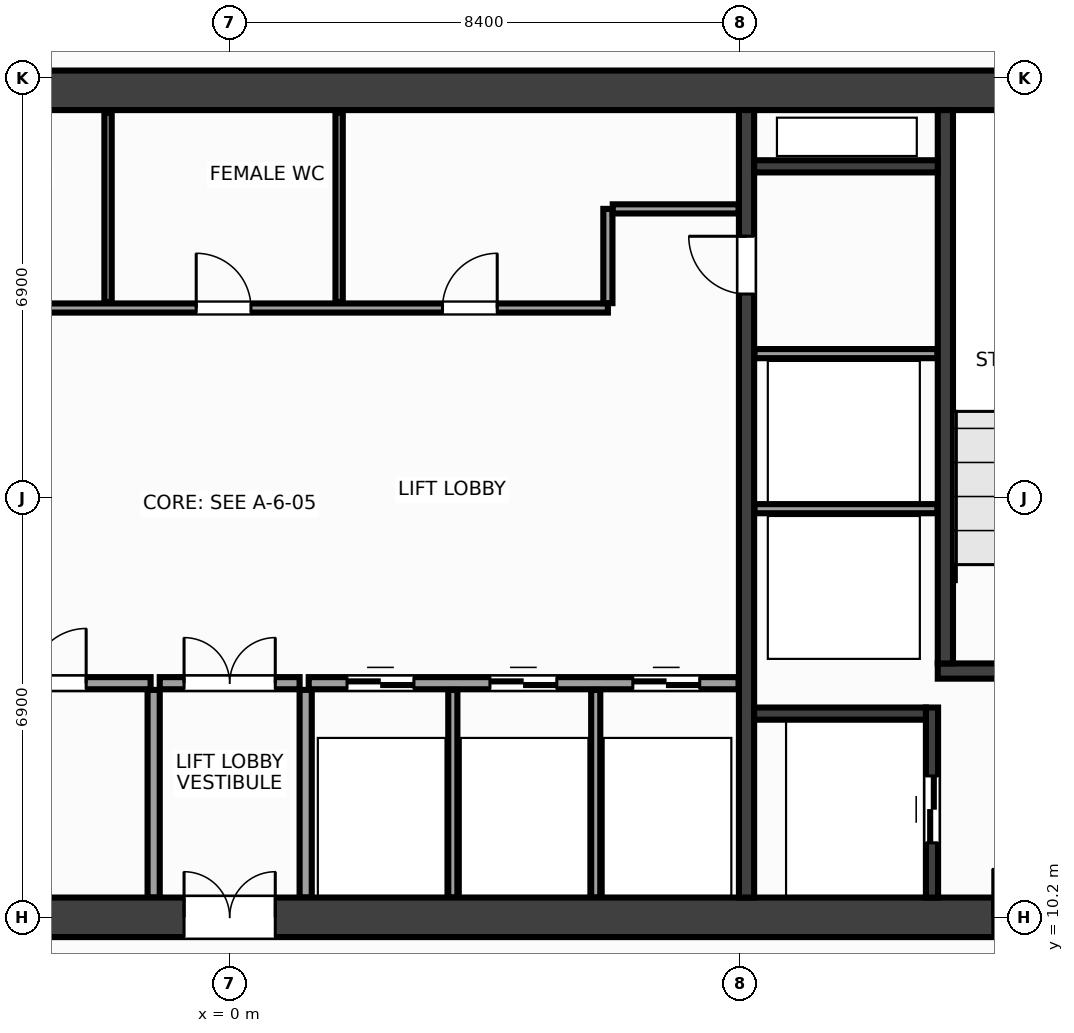
"""IFC4 building model, lengths in metres.
Left out: names, types, materials, properties, quantities, classifications, styles, units other than length and angle.
Written with IfcOpenShell. Run it as: python <this file> out.ifc"""

import sys

from ifc_helpers import new_model, si_unit, direction, frame, frame_2d, origin, place, context, subcontext, project, spatial, rectangle, extrude, source, transform, mapped, element, fill, save


model = new_model("IFC4")
c1 = context("Model", 3, precision=1e-05, world=origin(), true_north=direction((0.0, 1.0)))
c2 = subcontext(c1, "Body", "Model", "MODEL_VIEW")
j1 = project(units=[si_unit("LENGTHUNIT", "METRE"), si_unit("PLANEANGLEUNIT", "RADIAN")], contexts=[c1])
p1 = place(None, origin())
s1 = spatial("IfcSite", under=j1, at=p1, CompositionType="ELEMENT")
p2 = place(p1, origin())
s2 = spatial("IfcBuilding", under=s1, at=p2, CompositionType="ELEMENT")
p3 = place(p2, frame((0.0, 0.0, 160.4)))
s3 = spatial("IfcBuildingStorey", under=s2, at=p3, CompositionType="ELEMENT", Elevation=160.4)
m1 = source(origin(), c2, "Body", "SweptSolid", [
    extrude(rectangle(XDim=31.85, YDim=0.65, at=frame_2d((15.925, 0.0))), origin(), (0.0, 0.0, 1.0), 3.6),
])
p4 = place(p3, frame((-15.925, 23.8, 0.0), z_axis=(0.0, 0.0, 1.0), x_axis=(1.0, 0.0, 0.0)))
e1 = element("IfcWall", 1, at=p4, inside=s3, PredefinedType="SHEAR", context=c2, shape_type="MappedRepresentation", body=[
    mapped(m1, transform((0.0, 0.0, 0.0), x_axis=(1.0, 0.0, 0.0), y_axis=(0.0, 1.0, 0.0), z_axis=(0.0, 0.0, 1.0), scale=1.0)),
])
p5 = place(p3, frame((-15.925, 10.2, 0.0), z_axis=(0.0, 0.0, 1.0), x_axis=(1.0, 0.0, 0.0)))
e2 = element("IfcWall", 2, at=p5, inside=s3, PredefinedType="SHEAR", context=c2, shape_type="MappedRepresentation", body=[
    mapped(m1, transform((0.0, 0.0, 0.0), x_axis=(1.0, 0.0, 0.0), y_axis=(0.0, 1.0, 0.0), z_axis=(0.0, 0.0, 1.0), scale=1.0)),
])
p6 = place(p5, frame((1.775, 0.0, 0.0)))
e3 = element("IfcOpeningElement", 3, at=p6, cuts=e2, PredefinedType="OPENING", context=c2, shape_type="SweptSolid", body=[
    extrude(rectangle(XDim=1.6, YDim=2.15, at=frame_2d((0.8, 1.075))), frame((0.0, 0.337, 0.0), z_axis=(0.0, -1.0, 0.0), x_axis=(1.0, 0.0, 0.0)), (0.0, 0.0, 1.0), 0.674),
])
p7 = place(p5, frame((28.475, 0.0, 0.0)))
e4 = element("IfcOpeningElement", 4, at=p7, cuts=e2, PredefinedType="OPENING", context=c2, shape_type="SweptSolid", body=[
    extrude(rectangle(XDim=1.6, YDim=2.15, at=frame_2d((0.8, 1.075))), frame((0.0, 0.337, 0.0), z_axis=(0.0, -1.0, 0.0), x_axis=(1.0, 0.0, 0.0)), (0.0, 0.0, 1.0), 0.674),
])
p8 = place(p5, frame((15.175, 0.0, 0.0)))
e5 = element("IfcOpeningElement", 5, at=p8, cuts=e2, PredefinedType="OPENING", context=c2, shape_type="SweptSolid", body=[
    extrude(rectangle(XDim=1.5, YDim=2.2, at=frame_2d((0.75, 1.1))), frame((0.0, 0.337, 0.0), z_axis=(0.0, -1.0, 0.0), x_axis=(1.0, 0.0, 0.0)), (0.0, 0.0, 1.0), 0.674),
])
m2 = source(origin(), c2, "Body", "SweptSolid", [
    extrude(rectangle(XDim=12.95, YDim=0.25, at=frame_2d((6.475, 0.0))), origin(), (0.0, 0.0, 1.0), 3.6),
])
p9 = place(p3, frame((8.5, 10.525, 0.0), z_axis=(0.0, 0.0, 1.0), x_axis=(0.0, 1.0, 0.0)))
e6 = element("IfcWall", 6, at=p9, inside=s3, PredefinedType="SHEAR", context=c2, shape_type="MappedRepresentation", body=[
    mapped(m2, transform((0.0, 0.0, 0.0), x_axis=(1.0, 0.0, 0.0), y_axis=(0.0, 1.0, 0.0), z_axis=(0.0, 0.0, 1.0), scale=1.0)),
])
p10 = place(p9, frame((9.925, 0.0, 0.0)))
e7 = element("IfcOpeningElement", 7, at=p10, cuts=e6, PredefinedType="OPENING", context=c2, shape_type="SweptSolid", body=[
    extrude(rectangle(XDim=0.95, YDim=2.15, at=frame_2d((0.475, 1.075))), frame((0.0, 0.137, 0.0), z_axis=(0.0, -1.0, 0.0), x_axis=(1.0, 0.0, 0.0)), (0.0, 0.0, 1.0), 0.274),
])
m3 = source(origin(), c2, "Body", "SweptSolid", [
    extrude(rectangle(XDim=3.63, YDim=0.25, at=frame_2d((1.815, 0.0))), origin(), (0.0, 0.0, 1.0), 3.6),
])
p11 = place(p3, frame((11.645, 14.25, 0.0), z_axis=(0.0, 0.0, 1.0), x_axis=(1.0, 0.0, 0.0)))
e8 = element("IfcWall", 8, at=p11, inside=s3, PredefinedType="SHEAR", context=c2, shape_type="MappedRepresentation", body=[
    mapped(m3, transform((0.0, 0.0, 0.0), x_axis=(1.0, 0.0, 0.0), y_axis=(0.0, 1.0, 0.0), z_axis=(0.0, 0.0, 1.0), scale=1.0)),
])
p12 = place(p11, frame((0.95, 0.0, 0.0)))
e9 = element("IfcOpeningElement", 9, at=p12, cuts=e8, PredefinedType="OPENING", context=c2, shape_type="SweptSolid", body=[
    extrude(rectangle(XDim=1.6, YDim=2.15, at=frame_2d((0.8, 1.075))), frame((0.0, 0.137, 0.0), z_axis=(0.0, -1.0, 0.0), x_axis=(1.0, 0.0, 0.0)), (0.0, 0.0, 1.0), 0.274),
])
m4 = source(origin(), c2, "Body", "SweptSolid", [
    extrude(rectangle(XDim=9.1, YDim=0.25, at=frame_2d((4.55, 0.0))), origin(), (0.0, 0.0, 1.0), 3.6),
])
p13 = place(p3, frame((11.77, 14.375, 0.0), z_axis=(0.0, 0.0, 1.0), x_axis=(0.0, 1.0, 0.0)))
e10 = element("IfcWall", 10, at=p13, inside=s3, PredefinedType="SHEAR", context=c2, shape_type="MappedRepresentation", body=[
    mapped(m4, transform((0.0, 0.0, 0.0), x_axis=(1.0, 0.0, 0.0), y_axis=(0.0, 1.0, 0.0), z_axis=(0.0, 0.0, 1.0), scale=1.0)),
])
m5 = source(origin(), c2, "Body", "SweptSolid", [
    extrude(rectangle(XDim=3.125, YDim=0.2, at=frame_2d((1.562, 0.0))), origin(), (0.0, 0.0, 1.0), 3.6),
])
p14 = place(p3, frame((11.55, 10.525, 0.0), z_axis=(0.0, 0.0, 1.0), x_axis=(0.0, 1.0, 0.0)))
e11 = element("IfcWall", 11, at=p14, inside=s3, PredefinedType="SHEAR", context=c2, shape_type="MappedRepresentation", body=[
    mapped(m5, transform((0.0, 0.0, 0.0), x_axis=(1.0, 0.0, 0.0), y_axis=(0.0, 1.0, 0.0), z_axis=(0.0, 0.0, 1.0), scale=1.0)),
])
p15 = place(p14, frame((0.9, 0.0, 0.0)))
e12 = element("IfcOpeningElement", 12, at=p15, cuts=e11, PredefinedType="OPENING", context=c2, shape_type="SweptSolid", body=[
    extrude(rectangle(XDim=1.1, YDim=2.15, at=frame_2d((0.55, 1.075))), frame((0.0, 0.112, 0.0), z_axis=(0.0, -1.0, 0.0), x_axis=(1.0, 0.0, 0.0)), (0.0, 0.0, 1.0), 0.224),
])
m6 = source(origin(), c2, "Body", "SweptSolid", [
    extrude(rectangle(XDim=2.825, YDim=0.2, at=frame_2d((1.413, 0.0))), origin(), (0.0, 0.0, 1.0), 3.6),
])
p16 = place(p3, frame((8.625, 13.55, 0.0), z_axis=(0.0, 0.0, 1.0), x_axis=(1.0, 0.0, 0.0)))
e13 = element("IfcWall", 13, at=p16, inside=s3, PredefinedType="SHEAR", context=c2, shape_type="MappedRepresentation", body=[
    mapped(m6, transform((0.0, 0.0, 0.0), x_axis=(1.0, 0.0, 0.0), y_axis=(0.0, 1.0, 0.0), z_axis=(0.0, 0.0, 1.0), scale=1.0)),
])
m7 = source(origin(), c2, "Body", "SweptSolid", [
    extrude(rectangle(XDim=3.02, YDim=0.2, at=frame_2d((1.51, 0.0))), origin(), (0.0, 0.0, 1.0), 3.6),
])
p17 = place(p3, frame((8.625, 22.55, 0.0), z_axis=(0.0, 0.0, 1.0), x_axis=(1.0, 0.0, 0.0)))
e14 = element("IfcWall", 14, at=p17, inside=s3, PredefinedType="SHEAR", context=c2, shape_type="MappedRepresentation", body=[
    mapped(m7, transform((0.0, 0.0, 0.0), x_axis=(1.0, 0.0, 0.0), y_axis=(0.0, 1.0, 0.0), z_axis=(0.0, 0.0, 1.0), scale=1.0)),
])
m8 = source(origin(), c2, "Body", "SweptSolid", [
    extrude(rectangle(XDim=3.01, YDim=0.15, at=frame_2d((1.505, 0.0))), origin(), (0.0, 0.0, 1.0), 3.38),
])
for number, where, z_axis, x_axis in (
    (15, (8.63, 16.92, 0.0), (0.0, 0.0, 1.0), (1.0, 0.0, 0.0)),
    (16, (8.63, 19.47, 0.0), (0.0, 0.0, 1.0), (1.0, 0.0, 0.0)),
):
    element("IfcWall", number, at=place(p3, frame(where, z_axis=z_axis, x_axis=x_axis)), inside=s3, PredefinedType="PARTITIONING", context=c2, shape_type="MappedRepresentation", body=[
        mapped(m8, transform((0.0, 0.0, 0.0), x_axis=(1.0, 0.0, 0.0), y_axis=(0.0, 1.0, 0.0), z_axis=(0.0, 0.0, 1.0), scale=1.0)),
    ])
m9 = source(origin(), c2, "Body", "SweptSolid", [
    extrude(rectangle(XDim=7.07, YDim=0.2, at=frame_2d((3.535, 0.0))), origin(), (0.0, 0.0, 1.0), 3.38),
])
p18 = place(p3, frame((-8.37, 14.05, 0.0), z_axis=(0.0, 0.0, 1.0), x_axis=(1.0, 0.0, 0.0)))
e17 = element("IfcWall", 17, at=p18, inside=s3, PredefinedType="PARTITIONING", context=c2, shape_type="MappedRepresentation", body=[
    mapped(m9, transform((0.0, 0.0, 0.0), x_axis=(1.0, 0.0, 0.0), y_axis=(0.0, 1.0, 0.0), z_axis=(0.0, 0.0, 1.0), scale=1.0)),
])
p19 = place(p18, frame((1.66, 0.0, 0.0)))
e18 = element("IfcOpeningElement", 18, at=p19, cuts=e17, PredefinedType="OPENING", context=c2, shape_type="SweptSolid", body=[
    extrude(rectangle(XDim=0.9, YDim=2.15, at=frame_2d((0.45, 1.075))), frame((0.0, 0.112, 0.0), z_axis=(0.0, -1.0, 0.0), x_axis=(1.0, 0.0, 0.0)), (0.0, 0.0, 1.0), 0.224),
])
p20 = place(p18, frame((5.11, 0.0, 0.0)))
e19 = element("IfcOpeningElement", 19, at=p20, cuts=e17, PredefinedType="OPENING", context=c2, shape_type="SweptSolid", body=[
    extrude(rectangle(XDim=0.9, YDim=2.15, at=frame_2d((0.45, 1.075))), frame((0.0, 0.112, 0.0), z_axis=(0.0, -1.0, 0.0), x_axis=(1.0, 0.0, 0.0)), (0.0, 0.0, 1.0), 0.224),
])
p21 = place(p3, frame((1.3, 14.05, 0.0), z_axis=(0.0, 0.0, 1.0), x_axis=(1.0, 0.0, 0.0)))
e20 = element("IfcWall", 20, at=p21, inside=s3, PredefinedType="PARTITIONING", context=c2, shape_type="MappedRepresentation", body=[
    mapped(m9, transform((0.0, 0.0, 0.0), x_axis=(1.0, 0.0, 0.0), y_axis=(0.0, 1.0, 0.0), z_axis=(0.0, 0.0, 1.0), scale=1.0)),
])
p22 = place(p21, frame((0.63, 0.0, 0.0)))
e21 = element("IfcOpeningElement", 21, at=p22, cuts=e20, PredefinedType="OPENING", context=c2, shape_type="SweptSolid", body=[
    extrude(rectangle(XDim=1.1, YDim=2.15, at=frame_2d((0.55, 1.075))), frame((0.0, 0.112, 0.0), z_axis=(0.0, -1.0, 0.0), x_axis=(1.0, 0.0, 0.0)), (0.0, 0.0, 1.0), 0.224),
])
p23 = place(p21, frame((2.98, 0.0, 0.0)))
e22 = element("IfcOpeningElement", 22, at=p23, cuts=e20, PredefinedType="OPENING", context=c2, shape_type="SweptSolid", body=[
    extrude(rectangle(XDim=1.1, YDim=2.15, at=frame_2d((0.55, 1.075))), frame((0.0, 0.112, 0.0), z_axis=(0.0, -1.0, 0.0), x_axis=(1.0, 0.0, 0.0)), (0.0, 0.0, 1.0), 0.224),
])
p24 = place(p21, frame((5.33, 0.0, 0.0)))
e23 = element("IfcOpeningElement", 23, at=p24, cuts=e20, PredefinedType="OPENING", context=c2, shape_type="SweptSolid", body=[
    extrude(rectangle(XDim=1.1, YDim=2.15, at=frame_2d((0.55, 1.075))), frame((0.0, 0.112, 0.0), z_axis=(0.0, -1.0, 0.0), x_axis=(1.0, 0.0, 0.0)), (0.0, 0.0, 1.0), 0.224),
])
m10 = source(origin(), c2, "Body", "SweptSolid", [
    extrude(rectangle(XDim=3.415, YDim=0.2, at=frame_2d((1.708, 0.0))), origin(), (0.0, 0.0, 1.0), 3.38),
])
for number, where, z_axis, x_axis in (
    (24, (-1.25, 10.525, 0.0), (0.0, 0.0, 1.0), (0.0, 1.0, 0.0)),
    (25, (1.25, 10.525, 0.0), (0.0, 0.0, 1.0), (0.0, 1.0, 0.0)),
):
    element("IfcWall", number, at=place(p3, frame(where, z_axis=z_axis, x_axis=x_axis)), inside=s3, PredefinedType="PARTITIONING", context=c2, shape_type="MappedRepresentation", body=[
        mapped(m10, transform((0.0, 0.0, 0.0), x_axis=(1.0, 0.0, 0.0), y_axis=(0.0, 1.0, 0.0), z_axis=(0.0, 0.0, 1.0), scale=1.0)),
    ])
m11 = source(origin(), c2, "Body", "SweptSolid", [
    extrude(rectangle(XDim=2.3, YDim=0.2, at=frame_2d((1.15, 0.0))), origin(), (0.0, 0.0, 1.0), 3.38),
])
p25 = place(p3, frame((-1.15, 14.05, 0.0), z_axis=(0.0, 0.0, 1.0), x_axis=(1.0, 0.0, 0.0)))
e26 = element("IfcWall", 26, at=p25, inside=s3, PredefinedType="PARTITIONING", context=c2, shape_type="MappedRepresentation", body=[
    mapped(m11, transform((0.0, 0.0, 0.0), x_axis=(1.0, 0.0, 0.0), y_axis=(0.0, 1.0, 0.0), z_axis=(0.0, 0.0, 1.0), scale=1.0)),
])
p26 = place(p25, frame((0.4, 0.0, 0.0)))
e27 = element("IfcOpeningElement", 27, at=p26, cuts=e26, PredefinedType="OPENING", context=c2, shape_type="SweptSolid", body=[
    extrude(rectangle(XDim=1.5, YDim=2.2, at=frame_2d((0.75, 1.1))), frame((0.0, 0.112, 0.0), z_axis=(0.0, -1.0, 0.0), x_axis=(1.0, 0.0, 0.0)), (0.0, 0.0, 1.0), 0.224),
])
m12 = source(origin(), c2, "Body", "SweptSolid", [
    extrude(rectangle(XDim=14.59, YDim=0.15, at=frame_2d((7.295, 0.0))), origin(), (0.0, 0.0, 1.0), 3.38),
])
p27 = place(p3, frame((-8.37, 20.22, 0.0), z_axis=(0.0, 0.0, 1.0), x_axis=(1.0, 0.0, 0.0)))
e28 = element("IfcWall", 28, at=p27, inside=s3, PredefinedType="PARTITIONING", context=c2, shape_type="MappedRepresentation", body=[
    mapped(m12, transform((0.0, 0.0, 0.0), x_axis=(1.0, 0.0, 0.0), y_axis=(0.0, 1.0, 0.0), z_axis=(0.0, 0.0, 1.0), scale=1.0)),
])
p28 = place(p27, frame((1.06, 0.0, 0.0)))
e29 = element("IfcOpeningElement", 29, at=p28, cuts=e28, PredefinedType="OPENING", context=c2, shape_type="SweptSolid", body=[
    extrude(rectangle(XDim=0.9, YDim=2.15, at=frame_2d((0.45, 1.075))), frame((0.0, 0.087, 0.0), z_axis=(0.0, -1.0, 0.0), x_axis=(1.0, 0.0, 0.0)), (0.0, 0.0, 1.0), 0.174),
])
p29 = place(p27, frame((4.22, 0.0, 0.0)))
e30 = element("IfcOpeningElement", 30, at=p29, cuts=e28, PredefinedType="OPENING", context=c2, shape_type="SweptSolid", body=[
    extrude(rectangle(XDim=0.9, YDim=2.15, at=frame_2d((0.45, 1.075))), frame((0.0, 0.087, 0.0), z_axis=(0.0, -1.0, 0.0), x_axis=(1.0, 0.0, 0.0)), (0.0, 0.0, 1.0), 0.174),
])
p30 = place(p27, frame((7.82, 0.0, 0.0)))
e31 = element("IfcOpeningElement", 31, at=p30, cuts=e28, PredefinedType="OPENING", context=c2, shape_type="SweptSolid", body=[
    extrude(rectangle(XDim=0.9, YDim=2.15, at=frame_2d((0.45, 1.075))), frame((0.0, 0.087, 0.0), z_axis=(0.0, -1.0, 0.0), x_axis=(1.0, 0.0, 0.0)), (0.0, 0.0, 1.0), 0.174),
])
p31 = place(p27, frame((11.87, 0.0, 0.0)))
e32 = element("IfcOpeningElement", 32, at=p31, cuts=e28, PredefinedType="OPENING", context=c2, shape_type="SweptSolid", body=[
    extrude(rectangle(XDim=0.9, YDim=2.15, at=frame_2d((0.45, 1.075))), frame((0.0, 0.087, 0.0), z_axis=(0.0, -1.0, 0.0), x_axis=(1.0, 0.0, 0.0)), (0.0, 0.0, 1.0), 0.174),
])
m13 = source(origin(), c2, "Body", "SweptSolid", [
    extrude(rectangle(XDim=1.55, YDim=0.15, at=frame_2d((0.775, 0.0))), origin(), (0.0, 0.0, 1.0), 3.38),
])
p32 = place(p3, frame((6.22, 20.3, 0.0), z_axis=(0.0, 0.0, 1.0), x_axis=(0.0, 1.0, 0.0)))
e33 = element("IfcWall", 33, at=p32, inside=s3, PredefinedType="PARTITIONING", context=c2, shape_type="MappedRepresentation", body=[
    mapped(m13, transform((0.0, 0.0, 0.0), x_axis=(1.0, 0.0, 0.0), y_axis=(0.0, 1.0, 0.0), z_axis=(0.0, 0.0, 1.0), scale=1.0)),
])
m14 = source(origin(), c2, "Body", "SweptSolid", [
    extrude(rectangle(XDim=2.07, YDim=0.15, at=frame_2d((1.035, 0.0))), origin(), (0.0, 0.0, 1.0), 3.38),
])
p33 = place(p3, frame((6.3, 21.85, 0.0), z_axis=(0.0, 0.0, 1.0), x_axis=(1.0, 0.0, 0.0)))
e34 = element("IfcWall", 34, at=p33, inside=s3, PredefinedType="PARTITIONING", context=c2, shape_type="MappedRepresentation", body=[
    mapped(m14, transform((0.0, 0.0, 0.0), x_axis=(1.0, 0.0, 0.0), y_axis=(0.0, 1.0, 0.0), z_axis=(0.0, 0.0, 1.0), scale=1.0)),
])
m15 = source(origin(), c2, "Body", "SweptSolid", [
    extrude(rectangle(XDim=3.415, YDim=0.15, at=frame_2d((1.708, 0.0))), origin(), (0.0, 0.0, 1.0), 3.38),
])
for number, where, z_axis, x_axis in (
    (35, (3.67, 10.525, 0.0), (0.0, 0.0, 1.0), (0.0, 1.0, 0.0)),
    (36, (6.02, 10.525, 0.0), (0.0, 0.0, 1.0), (0.0, 1.0, 0.0)),
):
    element("IfcWall", number, at=place(p3, frame(where, z_axis=z_axis, x_axis=x_axis)), inside=s3, PredefinedType="PARTITIONING", context=c2, shape_type="MappedRepresentation", body=[
        mapped(m15, transform((0.0, 0.0, 0.0), x_axis=(1.0, 0.0, 0.0), y_axis=(0.0, 1.0, 0.0), z_axis=(0.0, 0.0, 1.0), scale=1.0)),
    ])
m16 = source(origin(), c2, "Body", "SweptSolid", [
    extrude(rectangle(XDim=3.115, YDim=0.12, at=frame_2d((1.558, 0.0))), origin(), (0.0, 0.0, 1.0), 3.38),
])
for number, where, z_axis, x_axis in (
    (37, (-2.0, 20.32, 0.0), (0.0, 0.0, 1.0), (0.0, 1.0, 0.0)),
    (38, (1.8, 20.32, 0.0), (0.0, 0.0, 1.0), (0.0, 1.0, 0.0)),
):
    element("IfcWall", number, at=place(p3, frame(where, z_axis=z_axis, x_axis=x_axis)), inside=s3, PredefinedType="PARTITIONING", context=c2, shape_type="MappedRepresentation", body=[
        mapped(m16, transform((0.0, 0.0, 0.0), x_axis=(1.0, 0.0, 0.0), y_axis=(0.0, 1.0, 0.0), z_axis=(0.0, 0.0, 1.0), scale=1.0)),
    ])
m17 = source(origin(), c2, "Body", "SweptSolid", [
    extrude(rectangle(XDim=1.6, YDim=2.15, at=frame_2d((0.8, 1.075))), frame((0.0, 0.025, 0.0), z_axis=(0.0, -1.0, 0.0), x_axis=(1.0, 0.0, 0.0)), (0.0, 0.0, 1.0), 0.05),
])
p34 = place(p7, origin())
e39 = element("IfcDoor", 39, at=p34, inside=s3, OperationType="DOUBLE_DOOR_SINGLE_SWING", PredefinedType="DOOR", context=c2, shape_type="MappedRepresentation", body=[
    mapped(m17, transform((0.0, 0.0, 0.0), x_axis=(1.0, 0.0, 0.0), y_axis=(0.0, 1.0, 0.0), z_axis=(0.0, 0.0, 1.0), scale=1.0)),
])
fill(e4, e39)
m18 = source(origin(), c2, "Body", "SweptSolid", [
    extrude(rectangle(XDim=1.1, YDim=2.15, at=frame_2d((0.55, 1.075))), frame((0.0, 0.025, 0.0), z_axis=(0.0, -1.0, 0.0), x_axis=(1.0, 0.0, 0.0)), (0.0, 0.0, 1.0), 0.05),
])
p35 = place(p15, origin())
e40 = element("IfcDoor", 40, at=p35, inside=s3, OperationType="DOUBLE_DOOR_SLIDING", PredefinedType="DOOR", context=c2, shape_type="MappedRepresentation", body=[
    mapped(m18, transform((0.0, 0.0, 0.0), x_axis=(1.0, 0.0, 0.0), y_axis=(0.0, 1.0, 0.0), z_axis=(0.0, 0.0, 1.0), scale=1.0)),
])
fill(e12, e40)
m19 = source(origin(), c2, "Body", "SweptSolid", [
    extrude(rectangle(XDim=0.95, YDim=2.15, at=frame_2d((0.475, 1.075))), frame((0.0, 0.025, 0.0), z_axis=(0.0, -1.0, 0.0), x_axis=(1.0, 0.0, 0.0)), (0.0, 0.0, 1.0), 0.05),
])
p36 = place(p10, origin())
e41 = element("IfcDoor", 41, at=p36, inside=s3, OperationType="SINGLE_SWING_RIGHT", PredefinedType="DOOR", context=c2, shape_type="MappedRepresentation", body=[
    mapped(m19, transform((0.0, 0.0, 0.0), x_axis=(1.0, 0.0, 0.0), y_axis=(0.0, 1.0, 0.0), z_axis=(0.0, 0.0, 1.0), scale=1.0)),
])
fill(e7, e41)
m20 = source(origin(), c2, "Body", "SweptSolid", [
    extrude(rectangle(XDim=0.9, YDim=2.15, at=frame_2d((0.45, 1.075))), frame((0.0, 0.025, 0.0), z_axis=(0.0, -1.0, 0.0), x_axis=(1.0, 0.0, 0.0)), (0.0, 0.0, 1.0), 0.05),
])
p37 = place(p20, origin())
e42 = element("IfcDoor", 42, at=p37, inside=s3, OperationType="SINGLE_SWING_RIGHT", PredefinedType="DOOR", context=c2, shape_type="MappedRepresentation", body=[
    mapped(m20, transform((0.0, 0.0, 0.0), x_axis=(1.0, 0.0, 0.0), y_axis=(0.0, 1.0, 0.0), z_axis=(0.0, 0.0, 1.0), scale=1.0)),
])
fill(e19, e42)
p38 = place(p22, origin())
e43 = element("IfcDoor", 43, at=p38, inside=s3, OperationType="DOUBLE_DOOR_SLIDING", PredefinedType="DOOR", context=c2, shape_type="MappedRepresentation", body=[
    mapped(m18, transform((0.0, 0.0, 0.0), x_axis=(1.0, 0.0, 0.0), y_axis=(0.0, 1.0, 0.0), z_axis=(0.0, 0.0, 1.0), scale=1.0)),
])
fill(e21, e43)
p39 = place(p23, origin())
e44 = element("IfcDoor", 44, at=p39, inside=s3, OperationType="DOUBLE_DOOR_SLIDING", PredefinedType="DOOR", context=c2, shape_type="MappedRepresentation", body=[
    mapped(m18, transform((0.0, 0.0, 0.0), x_axis=(1.0, 0.0, 0.0), y_axis=(0.0, 1.0, 0.0), z_axis=(0.0, 0.0, 1.0), scale=1.0)),
])
fill(e22, e44)
p40 = place(p24, origin())
e45 = element("IfcDoor", 45, at=p40, inside=s3, OperationType="DOUBLE_DOOR_SLIDING", PredefinedType="DOOR", context=c2, shape_type="MappedRepresentation", body=[
    mapped(m18, transform((0.0, 0.0, 0.0), x_axis=(1.0, 0.0, 0.0), y_axis=(0.0, 1.0, 0.0), z_axis=(0.0, 0.0, 1.0), scale=1.0)),
])
fill(e23, e45)
m21 = source(origin(), c2, "Body", "SweptSolid", [
    extrude(rectangle(XDim=1.5, YDim=2.2, at=frame_2d((0.75, 1.1))), frame((0.0, 0.025, 0.0), z_axis=(0.0, -1.0, 0.0), x_axis=(1.0, 0.0, 0.0)), (0.0, 0.0, 1.0), 0.05),
])
p41 = place(p26, origin())
e46 = element("IfcDoor", 46, at=p41, inside=s3, OperationType="DOUBLE_DOOR_SINGLE_SWING", PredefinedType="DOOR", context=c2, shape_type="MappedRepresentation", body=[
    mapped(m21, transform((0.0, 0.0, 0.0), x_axis=(1.0, 0.0, 0.0), y_axis=(0.0, 1.0, 0.0), z_axis=(0.0, 0.0, 1.0), scale=1.0)),
])
fill(e27, e46)
p42 = place(p8, origin())
e47 = element("IfcDoor", 47, at=p42, inside=s3, OperationType="DOUBLE_DOOR_SINGLE_SWING", PredefinedType="DOOR", context=c2, shape_type="MappedRepresentation", body=[
    mapped(m21, transform((0.0, 0.0, 0.0), x_axis=(1.0, 0.0, 0.0), y_axis=(0.0, 1.0, 0.0), z_axis=(0.0, 0.0, 1.0), scale=1.0)),
])
fill(e5, e47)
p43 = place(p30, origin())
e48 = element("IfcDoor", 48, at=p43, inside=s3, OperationType="SINGLE_SWING_LEFT", PredefinedType="DOOR", context=c2, shape_type="MappedRepresentation", body=[
    mapped(m20, transform((0.0, 0.0, 0.0), x_axis=(1.0, 0.0, 0.0), y_axis=(0.0, 1.0, 0.0), z_axis=(0.0, 0.0, 1.0), scale=1.0)),
])
fill(e31, e48)
p44 = place(p31, origin())
e49 = element("IfcDoor", 49, at=p44, inside=s3, OperationType="SINGLE_SWING_RIGHT", PredefinedType="DOOR", context=c2, shape_type="MappedRepresentation", body=[
    mapped(m20, transform((0.0, 0.0, 0.0), x_axis=(1.0, 0.0, 0.0), y_axis=(0.0, 1.0, 0.0), z_axis=(0.0, 0.0, 1.0), scale=1.0)),
])
fill(e32, e49)
save(model, sys.argv[1])
